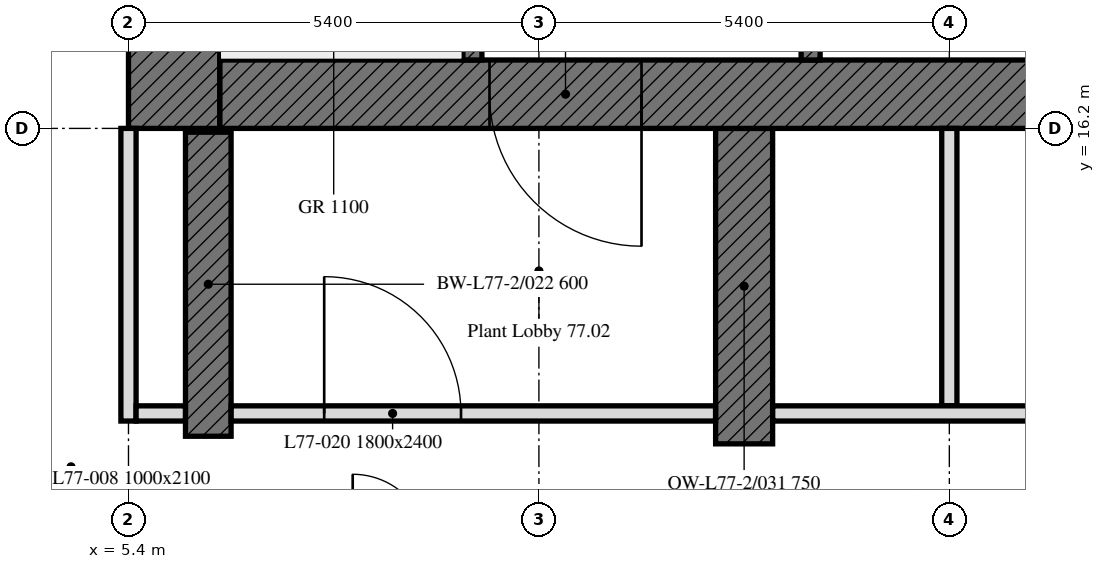
"""IFC4 building model, lengths in metres.
Left out: names, types, materials, properties, quantities, classifications, styles, units other than length and angle.
Written with IfcOpenShell. Run it as: python <this file> out.ifc"""

import sys

from ifc_helpers import new_model, si_unit, direction, frame, frame_2d, origin, place, context, subcontext, project, spatial, rectangle, extrude, element, fill, save


model = new_model("IFC4")
c1 = context("Model", 3, precision=1e-05, world=origin(), true_north=direction((0.0, 1.0)))
c2 = subcontext(c1, "Body", "Model", "MODEL_VIEW")
j1 = project(units=[si_unit("LENGTHUNIT", "METRE"), si_unit("PLANEANGLEUNIT", "RADIAN")], contexts=[c1])
p1 = place(None, origin())
s1 = spatial("IfcSite", under=j1, at=p1, CompositionType="ELEMENT")
p2 = place(p1, origin())
s2 = spatial("IfcBuilding", under=s1, at=p2, CompositionType="ELEMENT")
p3 = place(p2, frame((0.0, 0.0, 308.2)))
s3 = spatial("IfcBuildingStorey", under=s2, at=p3, CompositionType="ELEMENT", Elevation=308.2)
p4 = place(p3, frame((6.45, 12.15, 0.0), z_axis=(0.0, 0.0, 1.0), x_axis=(0.0, 1.0, 0.0)))
e1 = element("IfcWall", 1, at=p4, inside=s3, PredefinedType="SHEAR", context=c2, shape_type="SweptSolid", body=[
    extrude(rectangle(XDim=4.0, YDim=0.6, at=frame_2d((2.0, 0.0))), origin(), (0.0, 0.0, 1.0), 4.2),
])
p5 = place(p3, frame((13.5, 12.05, 0.0), z_axis=(0.0, 0.0, 1.0), x_axis=(0.0, 1.0, 0.0)))
e2 = element("IfcWall", 2, at=p5, inside=s3, PredefinedType="SHEAR", context=c2, shape_type="SweptSolid", body=[
    extrude(rectangle(XDim=4.15, YDim=0.75, at=frame_2d((2.075, 0.0))), origin(), (0.0, 0.0, 1.0), 4.2),
])
p6 = place(p3, frame((17.7, 16.65, 0.0), z_axis=(0.0, 0.0, 1.0), x_axis=(-1.0, 0.0, 0.0)))
e3 = element("IfcWall", 3, at=p6, inside=s3, PredefinedType="SOLIDWALL", context=c2, shape_type="SweptSolid", body=[
    extrude(rectangle(XDim=11.1, YDim=0.9, at=frame_2d((5.55, 0.0))), origin(), (0.0, 0.0, 1.0), 4.2),
])
p7 = place(p6, frame((5.55, 0.0, 0.0)))
e4 = element("IfcOpeningElement", 4, at=p7, cuts=e3, PredefinedType="OPENING", context=c2, shape_type="SweptSolid", body=[
    extrude(rectangle(XDim=2.0, YDim=2.4, at=frame_2d((1.0, 1.2))), frame((0.0, 0.45, 0.0), z_axis=(0.0, -1.0, 0.0), x_axis=(1.0, 0.0, 0.0)), (0.0, 0.0, 1.0), 0.9),
])
p8 = place(p3, frame((6.0, 16.2, 0.0), z_axis=(0.0, 0.0, 1.0), x_axis=(0.0, 1.0, 0.0)))
e5 = element("IfcWall", 5, at=p8, inside=s3, PredefinedType="SOLIDWALL", context=c2, shape_type="SweptSolid", body=[
    extrude(rectangle(XDim=16.2, YDim=1.2, at=frame_2d((8.1, 0.0))), origin(), (0.0, 0.0, 1.0), 4.2),
])
p9 = place(p3, frame((9.925, 17.1, 0.0), z_axis=(0.0, 0.0, 1.0), x_axis=(0.0, 1.0, 0.0)))
e6 = element("IfcWall", 6, at=p9, inside=s3, PredefinedType="SOLIDWALL", context=c2, shape_type="SweptSolid", body=[
    extrude(rectangle(XDim=14.4, YDim=0.25, at=frame_2d((7.2, 0.0))), origin(), (0.0, 0.0, 1.0), 4.2),
])
p10 = place(p9, frame((4.6, 0.0, 0.0)))
e7 = element("IfcOpeningElement", 7, at=p10, cuts=e6, PredefinedType="OPENING", context=c2, shape_type="SweptSolid", body=[
    extrude(rectangle(XDim=1.0, YDim=2.1, at=frame_2d((0.5, 1.05))), frame((0.0, 0.125, 0.0), z_axis=(0.0, -1.0, 0.0), x_axis=(1.0, 0.0, 0.0)), (0.0, 0.0, 1.0), 0.25),
])
p11 = place(p9, frame((7.062, 0.0, 0.0)))
e8 = element("IfcOpeningElement", 8, at=p11, cuts=e6, PredefinedType="OPENING", context=c2, shape_type="SweptSolid", body=[
    extrude(rectangle(XDim=1.2, YDim=2.1, at=frame_2d((0.6, 1.05))), frame((0.0, 0.125, 0.0), z_axis=(0.0, -1.0, 0.0), x_axis=(1.0, 0.0, 0.0)), (0.0, 0.0, 1.0), 0.25),
])
p12 = place(p9, frame((10.41, 0.0, 0.0)))
e9 = element("IfcOpeningElement", 9, at=p12, cuts=e6, PredefinedType="OPENING", context=c2, shape_type="SweptSolid", body=[
    extrude(rectangle(XDim=0.9, YDim=2.1, at=frame_2d((0.45, 1.05))), frame((0.0, 0.125, 0.0), z_axis=(0.0, -1.0, 0.0), x_axis=(1.0, 0.0, 0.0)), (0.0, 0.0, 1.0), 0.25),
])
p13 = place(p9, frame((13.023, 0.0, 0.0)))
e10 = element("IfcOpeningElement", 10, at=p13, cuts=e6, PredefinedType="OPENING", context=c2, shape_type="SweptSolid", body=[
    extrude(rectangle(XDim=0.9, YDim=2.1, at=frame_2d((0.45, 1.05))), frame((0.0, 0.125, 0.0), z_axis=(0.0, -1.0, 0.0), x_axis=(1.0, 0.0, 0.0)), (0.0, 0.0, 1.0), 0.25),
])
p14 = place(p3, frame((14.375, 17.1, 0.0), z_axis=(0.0, 0.0, 1.0), x_axis=(0.0, 1.0, 0.0)))
e11 = element("IfcWall", 11, at=p14, inside=s3, PredefinedType="SOLIDWALL", context=c2, shape_type="SweptSolid", body=[
    extrude(rectangle(XDim=14.4, YDim=0.25, at=frame_2d((7.2, 0.0))), origin(), (0.0, 0.0, 1.0), 4.2),
])
p15 = place(p14, frame((13.15, 0.0, 0.0)))
e12 = element("IfcOpeningElement", 12, at=p15, cuts=e11, PredefinedType="OPENING", context=c2, shape_type="SweptSolid", body=[
    extrude(rectangle(XDim=1.0, YDim=2.1, at=frame_2d((0.5, 1.05))), frame((0.0, 0.125, 0.0), z_axis=(0.0, -1.0, 0.0), x_axis=(1.0, 0.0, 0.0)), (0.0, 0.0, 1.0), 0.25),
])
p16 = place(p14, frame((0.7, 0.0, 0.0)))
e13 = element("IfcOpeningElement", 13, at=p16, cuts=e11, PredefinedType="OPENING", context=c2, shape_type="SweptSolid", body=[
    extrude(rectangle(XDim=0.9, YDim=2.1, at=frame_2d((0.45, 1.05))), frame((0.0, 0.125, 0.0), z_axis=(0.0, -1.0, 0.0), x_axis=(1.0, 0.0, 0.0)), (0.0, 0.0, 1.0), 0.25),
])
p17 = place(p14, frame((6.175, 0.0, 0.0)))
e14 = element("IfcOpeningElement", 14, at=p17, cuts=e11, PredefinedType="OPENING", context=c2, shape_type="SweptSolid", body=[
    extrude(rectangle(XDim=0.9, YDim=2.1, at=frame_2d((0.45, 1.05))), frame((0.0, 0.125, 0.0), z_axis=(0.0, -1.0, 0.0), x_axis=(1.0, 0.0, 0.0)), (0.0, 0.0, 1.0), 0.25),
])
p18 = place(p3, frame((16.2, 16.2, 0.0), z_axis=(0.0, 0.0, 1.0), x_axis=(0.0, -1.0, 0.0)))
e15 = element("IfcWall", 15, at=p18, inside=s3, PredefinedType="PARTITIONING", context=c2, shape_type="SweptSolid", body=[
    extrude(rectangle(XDim=3.65, YDim=0.2, at=frame_2d((1.825, 0.0))), origin(), (0.0, 0.0, 1.0), 4.2),
])
p19 = place(p3, frame((5.4, 16.2, 0.0), z_axis=(0.0, 0.0, 1.0), x_axis=(0.0, -1.0, 0.0)))
e16 = element("IfcWall", 16, at=p19, inside=s3, PredefinedType="PARTITIONING", context=c2, shape_type="SweptSolid", body=[
    extrude(rectangle(XDim=3.85, YDim=0.2, at=frame_2d((1.925, 0.0))), origin(), (0.0, 0.0, 1.0), 4.2),
])
p20 = place(p3, frame((5.5, 12.45, 0.0), z_axis=(0.0, 0.0, 1.0), x_axis=(1.0, 0.0, 0.0)))
e17 = element("IfcWall", 17, at=p20, inside=s3, PredefinedType="PARTITIONING", context=c2, shape_type="SweptSolid", body=[
    extrude(rectangle(XDim=0.649, YDim=0.2, at=frame_2d((0.324, 0.0))), origin(), (0.0, 0.0, 1.0), 4.2),
])
p21 = place(p3, frame((6.751, 12.45, 0.0), z_axis=(0.0, 0.0, 1.0), x_axis=(1.0, 0.0, 0.0)))
e18 = element("IfcWall", 18, at=p21, inside=s3, PredefinedType="PARTITIONING", context=c2, shape_type="SweptSolid", body=[
    extrude(rectangle(XDim=6.373, YDim=0.2, at=frame_2d((3.187, 0.0))), origin(), (0.0, 0.0, 1.0), 4.2),
])
p22 = place(p21, frame((1.224, 0.0, 0.0)))
e19 = element("IfcOpeningElement", 19, at=p22, cuts=e18, PredefinedType="OPENING", context=c2, shape_type="SweptSolid", body=[
    extrude(rectangle(XDim=1.8, YDim=2.4, at=frame_2d((0.9, 1.2))), frame((0.0, 0.1, 0.0), z_axis=(0.0, -1.0, 0.0), x_axis=(1.0, 0.0, 0.0)), (0.0, 0.0, 1.0), 0.2),
])
p23 = place(p3, frame((13.876, 12.45, 0.0), z_axis=(0.0, 0.0, 1.0), x_axis=(1.0, 0.0, 0.0)))
e20 = element("IfcWall", 20, at=p23, inside=s3, PredefinedType="PARTITIONING", context=c2, shape_type="SweptSolid", body=[
    extrude(rectangle(XDim=19.948, YDim=0.2, at=frame_2d((9.974, 0.0))), origin(), (0.0, 0.0, 1.0), 4.2),
])
p24 = place(p23, frame((15.324, 0.0, 0.0)))
e21 = element("IfcOpeningElement", 21, at=p24, cuts=e20, PredefinedType="OPENING", context=c2, shape_type="SweptSolid", body=[
    extrude(rectangle(XDim=1.0, YDim=2.1, at=frame_2d((0.5, 1.05))), frame((0.0, 0.1, 0.0), z_axis=(0.0, -1.0, 0.0), x_axis=(1.0, 0.0, 0.0)), (0.0, 0.0, 1.0), 0.2),
])
p25 = place(p23, frame((9.924, 0.0, 0.0)))
e22 = element("IfcOpeningElement", 22, at=p25, cuts=e20, PredefinedType="OPENING", context=c2, shape_type="SweptSolid", body=[
    extrude(rectangle(XDim=1.0, YDim=2.1, at=frame_2d((0.5, 1.05))), frame((0.0, 0.1, 0.0), z_axis=(0.0, -1.0, 0.0), x_axis=(1.0, 0.0, 0.0)), (0.0, 0.0, 1.0), 0.2),
])
p26 = place(p23, frame((4.624, 0.0, 0.0)))
e23 = element("IfcOpeningElement", 23, at=p26, cuts=e20, PredefinedType="OPENING", context=c2, shape_type="SweptSolid", body=[
    extrude(rectangle(XDim=0.8, YDim=2.1, at=frame_2d((0.4, 1.05))), frame((0.0, 0.1, 0.0), z_axis=(0.0, -1.0, 0.0), x_axis=(1.0, 0.0, 0.0)), (0.0, 0.0, 1.0), 0.2),
])
p27 = place(p7, origin())
e24 = element("IfcDoor", 24, at=p27, inside=s3, OperationType="DOUBLE_DOOR_SINGLE_SWING", PredefinedType="DOOR", context=c2, shape_type="SweptSolid", body=[
    extrude(rectangle(XDim=2.0, YDim=2.4, at=frame_2d((1.0, 1.2))), frame((0.0, 0.025, 0.0), z_axis=(0.0, -1.0, 0.0), x_axis=(1.0, 0.0, 0.0)), (0.0, 0.0, 1.0), 0.05),
])
fill(e4, e24)
p28 = place(p22, origin())
e25 = element("IfcDoor", 25, at=p28, inside=s3, OperationType="DOUBLE_DOOR_SINGLE_SWING", PredefinedType="DOOR", context=c2, shape_type="SweptSolid", body=[
    extrude(rectangle(XDim=1.8, YDim=2.4, at=frame_2d((0.9, 1.2))), frame((0.0, 0.025, 0.0), z_axis=(0.0, -1.0, 0.0), x_axis=(1.0, 0.0, 0.0)), (0.0, 0.0, 1.0), 0.05),
])
fill(e19, e25)
save(model, sys.argv[1])
